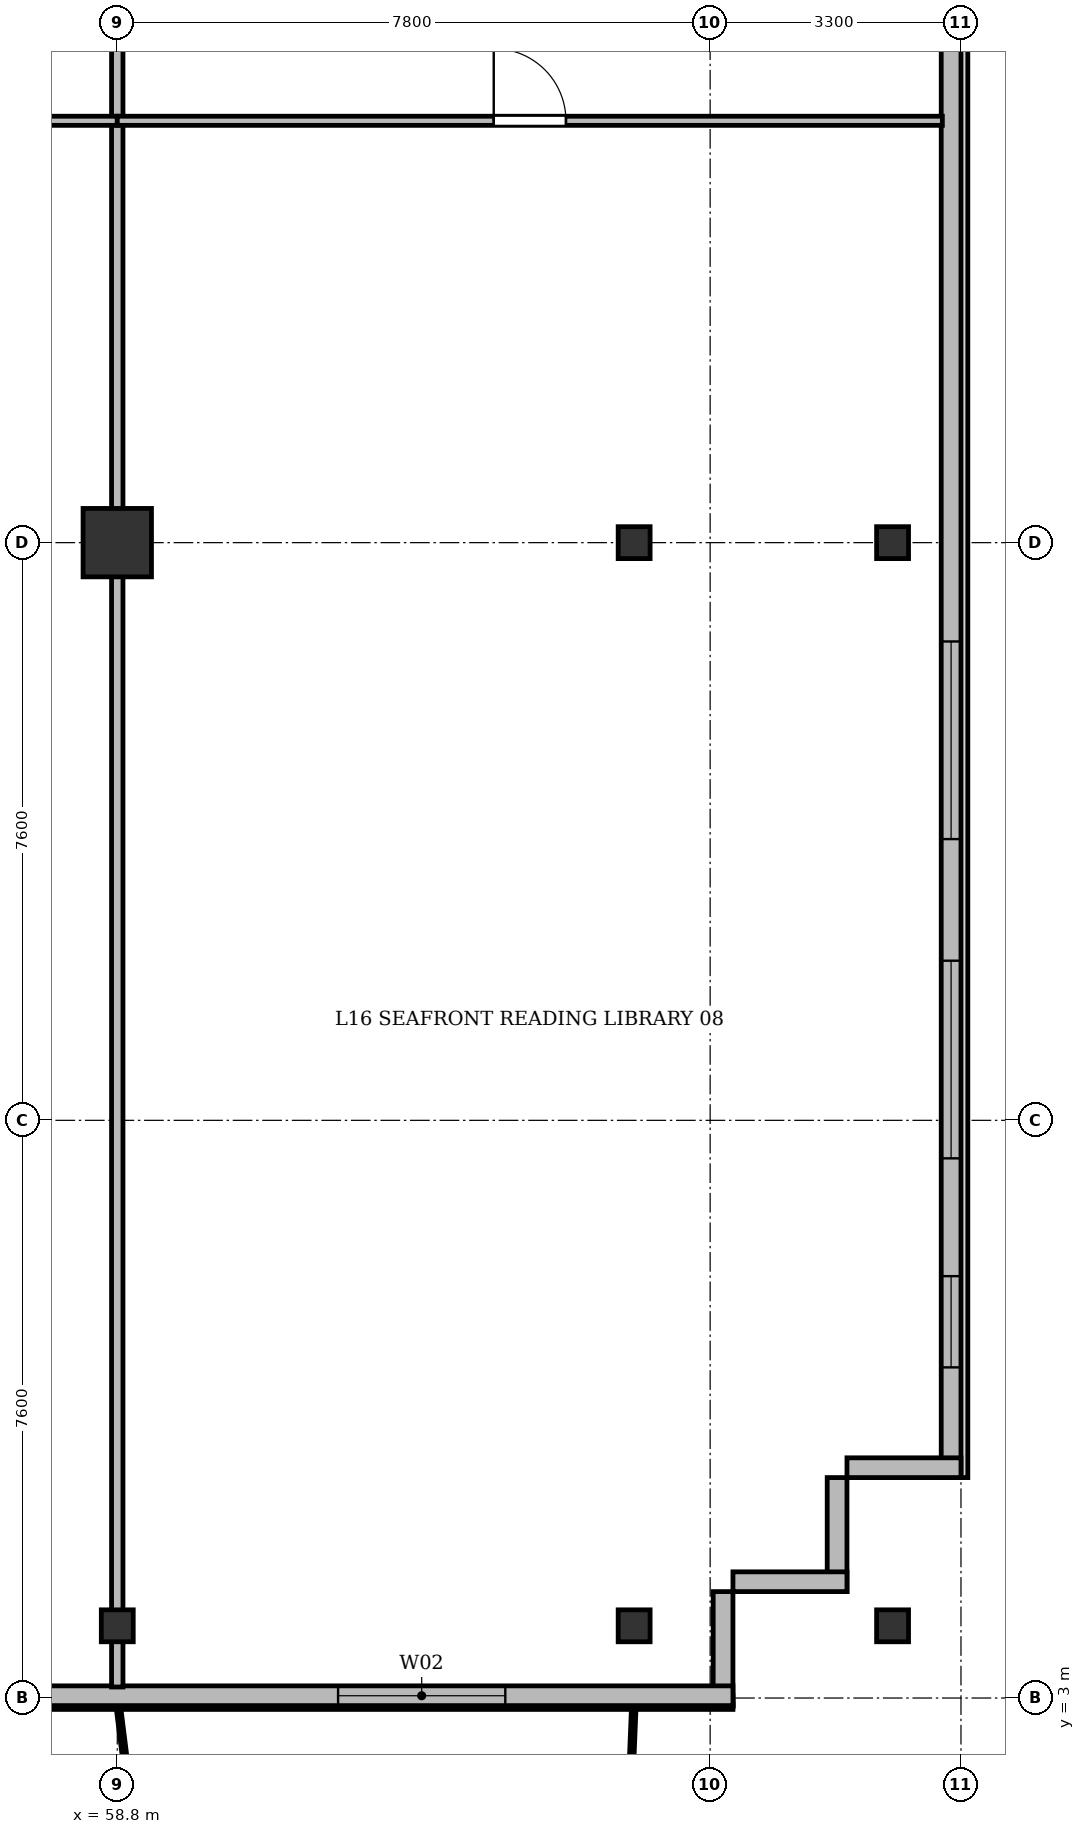
"""IFC4 building model, lengths in metres.
Left out: names, types, materials, properties, quantities, classifications, styles, units other than length and angle.
Written with IfcOpenShell. Run it as: python <this file> out.ifc"""

import sys

from ifc_helpers import new_model, si_unit, direction, frame, frame_2d, origin, origin_2d, place, context, subcontext, project, spatial, rectangle, i_section, extrude, source, transform, mapped, element, fill, save


model = new_model("IFC4")
c1 = context("Model", 3, precision=1e-05, world=origin(), true_north=direction((0.0, 1.0)))
c2 = subcontext(c1, "Body", "Model", "MODEL_VIEW")
j1 = project(units=[si_unit("LENGTHUNIT", "METRE"), si_unit("PLANEANGLEUNIT", "RADIAN")], contexts=[c1])
p1 = place(None, origin())
s1 = spatial("IfcSite", under=j1, at=p1, CompositionType="ELEMENT")
p2 = place(p1, origin())
s2 = spatial("IfcBuilding", under=s1, at=p2, CompositionType="ELEMENT")
p3 = place(p2, frame((0.0, 0.0, 63.1)))
s3 = spatial("IfcBuildingStorey", under=s2, at=p3, CompositionType="ELEMENT", Elevation=63.1)
m1 = source(origin(), c2, "Body", "SweptSolid", [
    extrude(i_section(OverallWidth=0.42, OverallDepth=0.42, WebThickness=0.026, FlangeThickness=0.04, at=origin_2d()), origin(), (0.0, 0.0, 1.0), 3.6),
])
p4 = place(p3, frame((58.8, 3.95, 0.0), z_axis=(0.0, 0.0, 1.0), x_axis=(1.0, 0.0, 0.0)))
e1 = element("IfcColumn", 1, at=p4, inside=s3, PredefinedType="COLUMN", context=c2, shape_type="MappedRepresentation", body=[
    mapped(m1, transform((0.0, 0.0, 0.0), x_axis=(1.0, 0.0, 0.0), y_axis=(0.0, 1.0, 0.0), z_axis=(0.0, 0.0, 1.0), scale=1.0)),
])
m2 = source(origin(), c2, "Body", "SweptSolid", [
    extrude(rectangle(XDim=0.9, YDim=0.9, at=origin_2d()), origin(), (0.0, 0.0, 1.0), 3.6),
])
p5 = place(p3, frame((58.8, 18.2, 0.0), z_axis=(0.0, 0.0, 1.0), x_axis=(1.0, 0.0, 0.0)))
e2 = element("IfcColumn", 2, at=p5, inside=s3, PredefinedType="COLUMN", context=c2, shape_type="MappedRepresentation", body=[
    mapped(m2, transform((0.0, 0.0, 0.0), x_axis=(1.0, 0.0, 0.0), y_axis=(0.0, 1.0, 0.0), z_axis=(0.0, 0.0, 1.0), scale=1.0)),
])
for number, where, z_axis, x_axis in (
    (3, (65.6, 3.95, 0.0), (0.0, 0.0, 1.0), (1.0, 0.0, 0.0)),
    (4, (65.6, 18.2, 0.0), (0.0, 0.0, 1.0), (1.0, 0.0, 0.0)),
    (5, (69.0, 3.95, 0.0), (0.0, 0.0, 1.0), (1.0, 0.0, 0.0)),
    (6, (69.0, 18.2, 0.0), (0.0, 0.0, 1.0), (1.0, 0.0, 0.0)),
):
    element("IfcColumn", number, at=place(p3, frame(where, z_axis=z_axis, x_axis=x_axis)), inside=s3, PredefinedType="COLUMN", context=c2, shape_type="MappedRepresentation", body=[
        mapped(m1, transform((0.0, 0.0, 0.0), x_axis=(1.0, 0.0, 0.0), y_axis=(0.0, 1.0, 0.0), z_axis=(0.0, 0.0, 1.0), scale=1.0)),
    ])
p6 = place(p3, frame((69.77, 45.5, 0.0), z_axis=(0.0, 0.0, 1.0), x_axis=(0.0, -1.0, 0.0)))
e7 = element("IfcWall", 7, at=p6, inside=s3, PredefinedType="SOLIDWALL", context=c2, shape_type="SweptSolid", body=[
    extrude(rectangle(XDim=39.6, YDim=0.26, at=frame_2d((19.8, 0.0))), origin(), (0.0, 0.0, 1.0), 3.34),
])
p7 = place(p6, frame((36.95, 0.0, 0.92)))
e8 = element("IfcOpeningElement", 8, at=p7, cuts=e7, PredefinedType="OPENING", context=c2, shape_type="SweptSolid", body=[
    extrude(rectangle(XDim=1.2, YDim=1.65, at=frame_2d((0.6, 0.825))), frame((0.0, 0.14, 0.0), z_axis=(0.0, -1.0, 0.0), x_axis=(1.0, 0.0, 0.0)), (0.0, 0.0, 1.0), 0.28),
])
p8 = place(p6, frame((32.8, 0.0, 0.92)))
e9 = element("IfcOpeningElement", 9, at=p8, cuts=e7, PredefinedType="OPENING", context=c2, shape_type="SweptSolid", body=[
    extrude(rectangle(XDim=2.6, YDim=1.9, at=frame_2d((1.3, 0.95))), frame((0.0, 0.14, 0.0), z_axis=(0.0, -1.0, 0.0), x_axis=(1.0, 0.0, 0.0)), (0.0, 0.0, 1.0), 0.28),
])
p9 = place(p6, frame((28.6, 0.0, 0.92)))
e10 = element("IfcOpeningElement", 10, at=p9, cuts=e7, PredefinedType="OPENING", context=c2, shape_type="SweptSolid", body=[
    extrude(rectangle(XDim=2.6, YDim=1.9, at=frame_2d((1.3, 0.95))), frame((0.0, 0.14, 0.0), z_axis=(0.0, -1.0, 0.0), x_axis=(1.0, 0.0, 0.0)), (0.0, 0.0, 1.0), 0.28),
])
p10 = place(p6, frame((7.4, 0.0, 0.92)))
e11 = element("IfcOpeningElement", 11, at=p10, cuts=e7, PredefinedType="OPENING", context=c2, shape_type="SweptSolid", body=[
    extrude(rectangle(XDim=2.6, YDim=1.9, at=frame_2d((1.3, 0.95))), frame((0.0, 0.14, 0.0), z_axis=(0.0, -1.0, 0.0), x_axis=(1.0, 0.0, 0.0)), (0.0, 0.0, 1.0), 0.28),
])
p11 = place(p6, frame((1.15, 0.0, 0.92)))
e12 = element("IfcOpeningElement", 12, at=p11, cuts=e7, PredefinedType="OPENING", context=c2, shape_type="SweptSolid", body=[
    extrude(rectangle(XDim=1.2, YDim=1.65, at=frame_2d((0.6, 0.825))), frame((0.0, 0.14, 0.0), z_axis=(0.0, -1.0, 0.0), x_axis=(1.0, 0.0, 0.0)), (0.0, 0.0, 1.0), 0.28),
])
p12 = place(p3, frame((69.9, 6.03, 0.0), z_axis=(0.0, 0.0, 1.0), x_axis=(-1.0, 0.0, 0.0)))
e13 = element("IfcWall", 13, at=p12, inside=s3, PredefinedType="SOLIDWALL", context=c2, shape_type="SweptSolid", body=[
    extrude(rectangle(XDim=1.5, YDim=0.26, at=frame_2d((0.75, 0.0))), origin(), (0.0, 0.0, 1.0), 2.752),
])
for number, where, z_axis, x_axis in (
    (14, (68.27, 5.9, 0.0), (0.0, 0.0, 1.0), (0.0, -1.0, 0.0)),
    (15, (68.4, 4.53, 0.0), (0.0, 0.0, 1.0), (-1.0, 0.0, 0.0)),
):
    element("IfcWall", number, at=place(p3, frame(where, z_axis=z_axis, x_axis=x_axis)), inside=s3, PredefinedType="SOLIDWALL", context=c2, shape_type="SweptSolid", body=[
        extrude(rectangle(XDim=1.5, YDim=0.26, at=frame_2d((0.75, 0.0))), origin(), (0.0, 0.0, 1.0), 3.34),
    ])
p13 = place(p3, frame((66.77, 4.4, 0.0), z_axis=(0.0, 0.0, 1.0), x_axis=(0.0, -1.0, 0.0)))
e16 = element("IfcWall", 16, at=p13, inside=s3, PredefinedType="SOLIDWALL", context=c2, shape_type="SweptSolid", body=[
    extrude(rectangle(XDim=1.5, YDim=0.26, at=frame_2d((0.75, 0.0))), origin(), (0.0, 0.0, 1.0), 2.69),
])
p14 = place(p3, frame((66.9, 3.03, 0.0), z_axis=(0.0, 0.0, 1.0), x_axis=(-1.0, 0.0, 0.0)))
e17 = element("IfcWall", 17, at=p14, inside=s3, PredefinedType="SOLIDWALL", context=c2, shape_type="SweptSolid", body=[
    extrude(rectangle(XDim=37.3, YDim=0.26, at=frame_2d((18.65, 0.0))), origin(), (0.0, 0.0, 1.0), 3.34),
])
p15 = place(p14, frame((2.995, 0.0, 0.9)))
e18 = element("IfcOpeningElement", 18, at=p15, cuts=e17, PredefinedType="OPENING", context=c2, shape_type="SweptSolid", body=[
    extrude(rectangle(XDim=2.2, YDim=1.8, at=frame_2d((1.1, 0.9))), frame((0.0, 0.14, 0.0), z_axis=(0.0, -1.0, 0.0), x_axis=(1.0, 0.0, 0.0)), (0.0, 0.0, 1.0), 0.28),
])
p16 = place(p14, frame((11.25, 0.0, 0.9)))
e19 = element("IfcOpeningElement", 19, at=p16, cuts=e17, PredefinedType="OPENING", context=c2, shape_type="SweptSolid", body=[
    extrude(rectangle(XDim=1.5, YDim=1.75, at=frame_2d((0.75, 0.875))), frame((0.0, 0.14, 0.0), z_axis=(0.0, -1.0, 0.0), x_axis=(1.0, 0.0, 0.0)), (0.0, 0.0, 1.0), 0.28),
])
p17 = place(p14, frame((17.007, 0.0, 0.0)))
e20 = element("IfcOpeningElement", 20, at=p17, cuts=e17, PredefinedType="OPENING", context=c2, shape_type="SweptSolid", body=[
    extrude(rectangle(XDim=1.2, YDim=2.2, at=frame_2d((0.6, 1.1))), frame((0.0, 0.14, 0.0), z_axis=(0.0, -1.0, 0.0), x_axis=(1.0, 0.0, 0.0)), (0.0, 0.0, 1.0), 0.28),
])
p18 = place(p14, frame((20.475, 0.0, 0.9)))
e21 = element("IfcOpeningElement", 21, at=p18, cuts=e17, PredefinedType="OPENING", context=c2, shape_type="SweptSolid", body=[
    extrude(rectangle(XDim=1.65, YDim=1.85, at=frame_2d((0.825, 0.925))), frame((0.0, 0.14, 0.0), z_axis=(0.0, -1.0, 0.0), x_axis=(1.0, 0.0, 0.0)), (0.0, 0.0, 1.0), 0.28),
])
p19 = place(p14, frame((28.8, 0.0, 0.9)))
e22 = element("IfcOpeningElement", 22, at=p19, cuts=e17, PredefinedType="OPENING", context=c2, shape_type="SweptSolid", body=[
    extrude(rectangle(XDim=1.8, YDim=1.8, at=frame_2d((0.9, 0.9))), frame((0.0, 0.14, 0.0), z_axis=(0.0, -1.0, 0.0), x_axis=(1.0, 0.0, 0.0)), (0.0, 0.0, 1.0), 0.28),
])
p20 = place(p3, frame((58.8, 3.145, 0.0), z_axis=(0.0, 0.0, 1.0), x_axis=(0.0, 1.0, 0.0)))
e23 = element("IfcWall", 23, at=p20, inside=s3, PredefinedType="PARTITIONING", context=c2, shape_type="SweptSolid", body=[
    extrude(rectangle(XDim=24.455, YDim=0.15, at=frame_2d((12.228, 0.0))), origin(), (0.0, 0.0, 1.0), 2.752),
])
p21 = place(p3, frame((51.0, 23.75, 0.0), z_axis=(0.0, 0.0, 1.0), x_axis=(1.0, 0.0, 0.0)))
e24 = element("IfcWall", 24, at=p21, inside=s3, PredefinedType="PARTITIONING", context=c2, shape_type="SweptSolid", body=[
    extrude(rectangle(XDim=7.8, YDim=0.12, at=frame_2d((3.9, 0.0))), origin(), (0.0, 0.0, 1.0), 2.752),
])
p22 = place(p21, frame((3.333, 0.0, 0.0)))
e25 = element("IfcOpeningElement", 25, at=p22, cuts=e24, PredefinedType="OPENING", context=c2, shape_type="SweptSolid", body=[
    extrude(rectangle(XDim=0.95, YDim=2.15, at=frame_2d((0.475, 1.075))), frame((0.0, 0.07, 0.0), z_axis=(0.0, -1.0, 0.0), x_axis=(1.0, 0.0, 0.0)), (0.0, 0.0, 1.0), 0.14),
])
p23 = place(p3, frame((58.8, 23.75, 0.0), z_axis=(0.0, 0.0, 1.0), x_axis=(1.0, 0.0, 0.0)))
e26 = element("IfcWall", 26, at=p23, inside=s3, PredefinedType="PARTITIONING", context=c2, shape_type="SweptSolid", body=[
    extrude(rectangle(XDim=10.855, YDim=0.12, at=frame_2d((5.427, 0.0))), origin(), (0.0, 0.0, 1.0), 2.752),
])
p24 = place(p23, frame((4.953, 0.0, 0.0)))
e27 = element("IfcOpeningElement", 27, at=p24, cuts=e26, PredefinedType="OPENING", context=c2, shape_type="SweptSolid", body=[
    extrude(rectangle(XDim=0.95, YDim=2.15, at=frame_2d((0.475, 1.075))), frame((0.0, 0.07, 0.0), z_axis=(0.0, -1.0, 0.0), x_axis=(1.0, 0.0, 0.0)), (0.0, 0.0, 1.0), 0.14),
])
m3 = source(origin(), c2, "Body", "SweptSolid", [
    extrude(rectangle(XDim=1.2, YDim=1.65, at=frame_2d((0.6, 0.825))), frame((0.0, 0.03, 0.0), z_axis=(0.0, -1.0, 0.0), x_axis=(1.0, 0.0, 0.0)), (0.0, 0.0, 1.0), 0.06),
])
p25 = place(p7, origin())
e28 = element("IfcWindow", 28, at=p25, inside=s3, PartitioningType="SINGLE_PANEL", PredefinedType="WINDOW", context=c2, shape_type="MappedRepresentation", body=[
    mapped(m3, transform((0.0, 0.0, 0.0), x_axis=(1.0, 0.0, 0.0), y_axis=(0.0, 1.0, 0.0), z_axis=(0.0, 0.0, 1.0), scale=1.0)),
])
fill(e8, e28)
m4 = source(origin(), c2, "Body", "SweptSolid", [
    extrude(rectangle(XDim=2.6, YDim=1.9, at=frame_2d((1.3, 0.95))), frame((0.0, 0.03, 0.0), z_axis=(0.0, -1.0, 0.0), x_axis=(1.0, 0.0, 0.0)), (0.0, 0.0, 1.0), 0.06),
])
p26 = place(p8, origin())
e29 = element("IfcWindow", 29, at=p26, inside=s3, PartitioningType="SINGLE_PANEL", PredefinedType="WINDOW", context=c2, shape_type="MappedRepresentation", body=[
    mapped(m4, transform((0.0, 0.0, 0.0), x_axis=(1.0, 0.0, 0.0), y_axis=(0.0, 1.0, 0.0), z_axis=(0.0, 0.0, 1.0), scale=1.0)),
])
fill(e9, e29)
p27 = place(p9, origin())
e30 = element("IfcWindow", 30, at=p27, inside=s3, PartitioningType="SINGLE_PANEL", PredefinedType="WINDOW", context=c2, shape_type="MappedRepresentation", body=[
    mapped(m4, transform((0.0, 0.0, 0.0), x_axis=(1.0, 0.0, 0.0), y_axis=(0.0, 1.0, 0.0), z_axis=(0.0, 0.0, 1.0), scale=1.0)),
])
fill(e10, e30)
m5 = source(origin(), c2, "Body", "SweptSolid", [
    extrude(rectangle(XDim=2.2, YDim=1.8, at=frame_2d((1.1, 0.9))), frame((0.0, 0.03, 0.0), z_axis=(0.0, -1.0, 0.0), x_axis=(1.0, 0.0, 0.0)), (0.0, 0.0, 1.0), 0.06),
])
p28 = place(p15, origin())
e31 = element("IfcWindow", 31, at=p28, inside=s3, PartitioningType="SINGLE_PANEL", PredefinedType="WINDOW", context=c2, shape_type="MappedRepresentation", body=[
    mapped(m5, transform((0.0, 0.0, 0.0), x_axis=(1.0, 0.0, 0.0), y_axis=(0.0, 1.0, 0.0), z_axis=(0.0, 0.0, 1.0), scale=1.0)),
])
fill(e18, e31)
m6 = source(origin(), c2, "Body", "SweptSolid", [
    extrude(rectangle(XDim=0.95, YDim=2.15, at=frame_2d((0.475, 1.075))), frame((0.0, 0.025, 0.0), z_axis=(0.0, -1.0, 0.0), x_axis=(1.0, 0.0, 0.0)), (0.0, 0.0, 1.0), 0.05),
])
p29 = place(p24, origin())
e32 = element("IfcDoor", 32, at=p29, inside=s3, OperationType="SINGLE_SWING_LEFT", PredefinedType="DOOR", context=c2, shape_type="MappedRepresentation", body=[
    mapped(m6, transform((0.0, 0.0, 0.0), x_axis=(1.0, 0.0, 0.0), y_axis=(0.0, 1.0, 0.0), z_axis=(0.0, 0.0, 1.0), scale=1.0)),
])
fill(e27, e32)
save(model, sys.argv[1])
